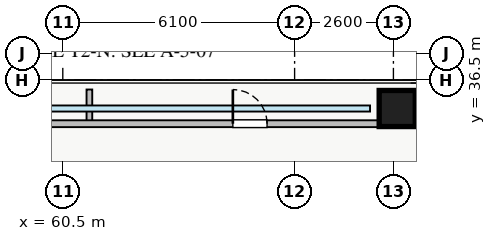
"""IFC4 building model, lengths in metres.
Left out: names, types, materials, properties, quantities, classifications, styles, units other than length and angle.
Written with IfcOpenShell. Run it as: python <this file> out.ifc"""

import sys

from ifc_helpers import new_model, si_unit, direction, frame, frame_2d, origin, origin_2d, place, context, subcontext, project, spatial, rectangle, extrude, source, transform, mapped, element, fill, save


model = new_model("IFC4")
c1 = context("Model", 3, precision=1e-05, world=origin(), true_north=direction((0.0, 1.0)))
c2 = subcontext(c1, "Body", "Model", "MODEL_VIEW")
j1 = project(units=[si_unit("LENGTHUNIT", "METRE"), si_unit("PLANEANGLEUNIT", "RADIAN")], contexts=[c1])
p1 = place(None, origin())
s1 = spatial("IfcSite", under=j1, at=p1, CompositionType="ELEMENT")
p2 = place(p1, origin())
s2 = spatial("IfcBuilding", under=s1, at=p2, CompositionType="ELEMENT")
p3 = place(p2, frame((0.0, 0.0, 32.75)))
s3 = spatial("IfcBuildingStorey", under=s2, at=p3, CompositionType="ELEMENT", Elevation=32.75)
m1 = source(origin(), c2, "Body", "SweptSolid", [
    extrude(rectangle(XDim=0.95, YDim=0.95, at=origin_2d()), origin(), (0.0, 0.0, 1.0), 3.25),
])
p4 = place(p3, frame((69.3, 35.75, 0.0), z_axis=(0.0, 0.0, 1.0), x_axis=(1.0, 0.0, 0.0)))
e1 = element("IfcColumn", 1, at=p4, inside=s3, PredefinedType="COLUMN", context=c2, shape_type="MappedRepresentation", body=[
    mapped(m1, transform((0.0, 0.0, 0.0), x_axis=(1.0, 0.0, 0.0), y_axis=(0.0, 1.0, 0.0), z_axis=(0.0, 0.0, 1.0), scale=1.0)),
])
for number, where, z_axis, x_axis in (
    (2, (61.2, 35.35, 0.0), (0.0, 0.0, 1.0), (0.0, 1.0, 0.0)),
    (3, (69.65, 35.35, 0.0), (0.0, 0.0, 1.0), (0.0, 1.0, 0.0)),
):
    element("IfcWall", number, at=place(p3, frame(where, z_axis=z_axis, x_axis=x_axis)), inside=s3, PredefinedType="PARTITIONING", context=c2, shape_type="SweptSolid", body=[
        extrude(rectangle(XDim=0.9, YDim=0.15, at=frame_2d((0.45, 0.0))), origin(), (0.0, 0.0, 1.0), 3.07),
    ])
p5 = place(p3, frame((52.65, 35.35, 0.0), z_axis=(0.0, 0.0, 1.0), x_axis=(1.0, 0.0, 0.0)))
e4 = element("IfcWall", 4, at=p5, inside=s3, PredefinedType="PARTITIONING", context=c2, shape_type="SweptSolid", body=[
    extrude(rectangle(XDim=17.0, YDim=0.18, at=frame_2d((8.5, 0.0))), origin(), (0.0, 0.0, 1.0), 3.07),
])
p6 = place(p5, frame((3.825, 0.0, 0.0)))
e5 = element("IfcOpeningElement", 5, at=p6, cuts=e4, PredefinedType="OPENING", context=c2, shape_type="SweptSolid", body=[
    extrude(rectangle(XDim=0.9, YDim=2.05, at=frame_2d((0.45, 1.025))), frame((0.0, 0.1, 0.0), z_axis=(0.0, -1.0, 0.0), x_axis=(1.0, 0.0, 0.0)), (0.0, 0.0, 1.0), 0.2),
])
p7 = place(p5, frame((12.325, 0.0, 0.0)))
e6 = element("IfcOpeningElement", 6, at=p7, cuts=e4, PredefinedType="OPENING", context=c2, shape_type="SweptSolid", body=[
    extrude(rectangle(XDim=0.9, YDim=2.05, at=frame_2d((0.45, 1.025))), frame((0.0, 0.1, 0.0), z_axis=(0.0, -1.0, 0.0), x_axis=(1.0, 0.0, 0.0)), (0.0, 0.0, 1.0), 0.2),
])
m2 = source(origin(), c2, "Body", "SweptSolid", [
    extrude(rectangle(XDim=0.9, YDim=2.05, at=frame_2d((0.45, 1.025))), frame((0.0, 0.025, 0.0), z_axis=(0.0, -1.0, 0.0), x_axis=(1.0, 0.0, 0.0)), (0.0, 0.0, 1.0), 0.05),
])
p8 = place(p7, origin())
e7 = element("IfcDoor", 7, at=p8, inside=s3, OperationType="SINGLE_SWING_LEFT", PredefinedType="DOOR", context=c2, shape_type="MappedRepresentation", body=[
    mapped(m2, transform((0.0, 0.0, 0.0), x_axis=(1.0, 0.0, 0.0), y_axis=(0.0, 1.0, 0.0), z_axis=(0.0, 0.0, 1.0), scale=1.0)),
])
fill(e6, e7)
save(model, sys.argv[1])
